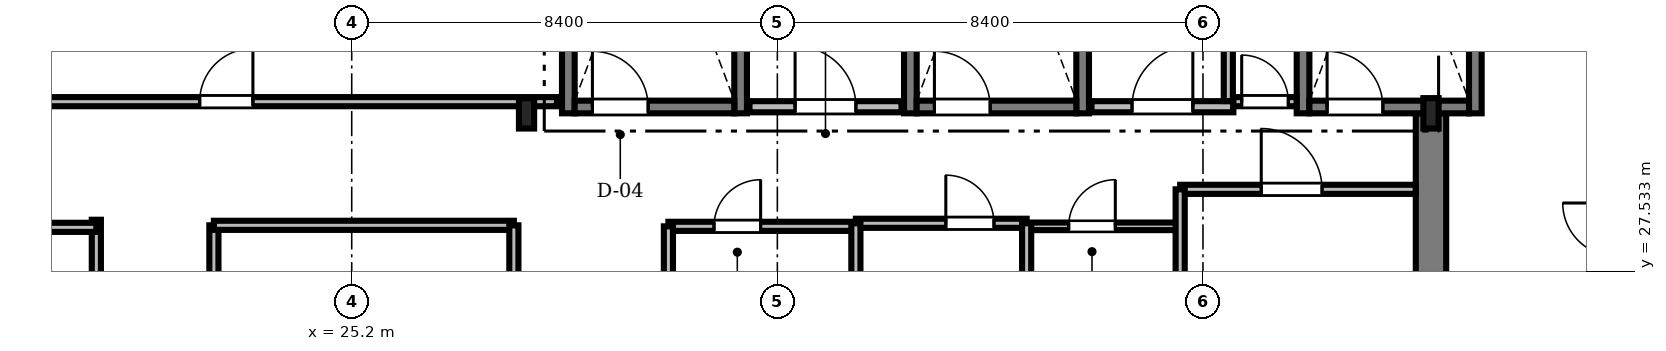
"""IFC4 building model, lengths in metres.
Left out: names, types, materials, properties, quantities, classifications, styles, units other than length and angle.
Written with IfcOpenShell. Run it as: python <this file> out.ifc"""

import sys

from ifc_helpers import new_model, si_unit, direction, frame, frame_2d, origin, origin_2d, place, context, subcontext, project, spatial, rectangle, i_section, extrude, source, transform, mapped, element, fill, save


model = new_model("IFC4")
c1 = context("Model", 3, precision=1e-05, world=origin(), true_north=direction((0.0, 1.0)))
c2 = subcontext(c1, "Body", "Model", "MODEL_VIEW")
j1 = project(units=[si_unit("LENGTHUNIT", "METRE"), si_unit("PLANEANGLEUNIT", "RADIAN")], contexts=[c1])
p1 = place(None, origin())
s1 = spatial("IfcSite", under=j1, at=p1, CompositionType="ELEMENT")
p2 = place(p1, origin())
s2 = spatial("IfcBuilding", under=s1, at=p2, CompositionType="ELEMENT")
p3 = place(p2, frame((0.0, 0.0, 242.7)))
s3 = spatial("IfcBuildingStorey", under=s2, at=p3, CompositionType="ELEMENT", Elevation=242.7)
m1 = source(origin(), c2, "Body", "SweptSolid", [
    extrude(rectangle(XDim=13.15, YDim=0.6, at=frame_2d((6.575, 0.0))), origin(), (0.0, 0.0, 1.0), 3.73),
])
p4 = place(p3, frame((46.5, 17.5, 0.0), z_axis=(0.0, 0.0, 1.0), x_axis=(0.0, 1.0, 0.0)))
e1 = element("IfcWall", 1, at=p4, inside=s3, PredefinedType="SHEAR", context=c2, shape_type="MappedRepresentation", body=[
    mapped(m1, transform((0.0, 0.0, 0.0), scale=1.0)),
])
m2 = source(origin(), c2, "Body", "SweptSolid", [
    extrude(i_section(OverallWidth=0.3, OverallDepth=0.6, WebThickness=0.015, FlangeThickness=0.03, FilletRadius=0.027, at=origin_2d()), origin(), (0.0, 0.0, 1.0), 3.73),
])
for number, where, z_axis, x_axis in (
    (2, (28.65, 30.65, 0.0), (0.0, 0.0, 1.0), (1.0, 0.0, 0.0)),
    (3, (46.5, 30.65, 0.0), (0.0, 0.0, 1.0), (1.0, 0.0, 0.0)),
):
    element("IfcColumn", number, at=place(p3, frame(where, z_axis=z_axis, x_axis=x_axis)), inside=s3, PredefinedType="COLUMN", context=c2, shape_type="MappedRepresentation", body=[
        mapped(m2, transform((0.0, 0.0, 0.0), scale=1.0)),
    ])
m3 = source(origin(), c2, "Body", "SweptSolid", [
    extrude(rectangle(XDim=9.35, YDim=0.25, at=frame_2d((4.675, 0.0))), origin(), (0.0, 0.0, 1.0), 3.75),
])
for number, where, z_axis, x_axis in (
    (4, (29.475, 30.65, 0.0), (0.0, 0.0, 1.0), (0.0, 1.0, 0.0)),
    (5, (32.875, 30.65, 0.0), (0.0, 0.0, 1.0), (0.0, 1.0, 0.0)),
):
    element("IfcWall", number, at=place(p3, frame(where, z_axis=z_axis, x_axis=x_axis)), inside=s3, PredefinedType="SOLIDWALL", context=c2, shape_type="MappedRepresentation", body=[
        mapped(m3, transform((0.0, 0.0, 0.0), scale=1.0)),
    ])
m4 = source(origin(), c2, "Body", "SweptSolid", [
    extrude(rectangle(XDim=3.15, YDim=0.25, at=frame_2d((1.575, 0.0))), origin(), (0.0, 0.0, 1.0), 3.75),
])
p5 = place(p3, frame((29.6, 30.775, 0.0), z_axis=(0.0, 0.0, 1.0), x_axis=(1.0, 0.0, 0.0)))
e6 = element("IfcWall", 6, at=p5, inside=s3, PredefinedType="SOLIDWALL", context=c2, shape_type="MappedRepresentation", body=[
    mapped(m4, transform((0.0, 0.0, 0.0), scale=1.0)),
])
m5 = source(origin(), c2, "Body", "SweptSolid", [
    extrude(rectangle(XDim=1.1, YDim=2.2, at=frame_2d((0.55, 1.1))), frame((0.0, 0.135, 0.0), z_axis=(0.0, -1.0, 0.0), x_axis=(1.0, 0.0, 0.0)), (0.0, 0.0, 1.0), 0.27),
])
p6 = place(p5, frame((0.35, 0.0, 0.0)))
e7 = element("IfcOpeningElement", 7, at=p6, cuts=e6, PredefinedType="OPENING", context=c2, shape_type="MappedRepresentation", body=[
    mapped(m5, transform((0.0, 0.0, 0.0), scale=1.0)),
])
for number, where, z_axis, x_axis in (
    (8, (36.225, 30.65, 0.0), (0.0, 0.0, 1.0), (0.0, 1.0, 0.0)),
    (9, (39.625, 30.65, 0.0), (0.0, 0.0, 1.0), (0.0, 1.0, 0.0)),
):
    element("IfcWall", number, at=place(p3, frame(where, z_axis=z_axis, x_axis=x_axis)), inside=s3, PredefinedType="SOLIDWALL", context=c2, shape_type="MappedRepresentation", body=[
        mapped(m3, transform((0.0, 0.0, 0.0), scale=1.0)),
    ])
p7 = place(p3, frame((36.35, 30.775, 0.0), z_axis=(0.0, 0.0, 1.0), x_axis=(1.0, 0.0, 0.0)))
e10 = element("IfcWall", 10, at=p7, inside=s3, PredefinedType="SOLIDWALL", context=c2, shape_type="MappedRepresentation", body=[
    mapped(m4, transform((0.0, 0.0, 0.0), scale=1.0)),
])
p8 = place(p7, frame((0.35, 0.0, 0.0)))
e11 = element("IfcOpeningElement", 11, at=p8, cuts=e10, PredefinedType="OPENING", context=c2, shape_type="MappedRepresentation", body=[
    mapped(m5, transform((0.0, 0.0, 0.0), scale=1.0)),
])
for number, where, z_axis, x_axis in (
    (12, (43.975, 30.65, 0.0), (0.0, 0.0, 1.0), (0.0, 1.0, 0.0)),
    (13, (47.375, 30.65, 0.0), (0.0, 0.0, 1.0), (0.0, 1.0, 0.0)),
):
    element("IfcWall", number, at=place(p3, frame(where, z_axis=z_axis, x_axis=x_axis)), inside=s3, PredefinedType="SOLIDWALL", context=c2, shape_type="MappedRepresentation", body=[
        mapped(m3, transform((0.0, 0.0, 0.0), scale=1.0)),
    ])
p9 = place(p3, frame((44.1, 30.775, 0.0), z_axis=(0.0, 0.0, 1.0), x_axis=(1.0, 0.0, 0.0)))
e14 = element("IfcWall", 14, at=p9, inside=s3, PredefinedType="SOLIDWALL", context=c2, shape_type="MappedRepresentation", body=[
    mapped(m4, transform((0.0, 0.0, 0.0), scale=1.0)),
])
p10 = place(p9, frame((0.35, 0.0, 0.0)))
e15 = element("IfcOpeningElement", 15, at=p10, cuts=e14, PredefinedType="OPENING", context=c2, shape_type="MappedRepresentation", body=[
    mapped(m5, transform((0.0, 0.0, 0.0), scale=1.0)),
])
m6 = source(origin(), c2, "Body", "SweptSolid", [
    extrude(rectangle(XDim=3.0, YDim=0.22, at=frame_2d((1.5, 0.0))), origin(), (0.0, 0.0, 1.0), 3.73),
])
p11 = place(p3, frame((33.05, 30.78, 0.0), z_axis=(0.0, 0.0, 1.0), x_axis=(1.0, 0.0, 0.0)))
e16 = element("IfcWall", 16, at=p11, inside=s3, PredefinedType="SOLIDWALL", context=c2, shape_type="MappedRepresentation", body=[
    mapped(m6, transform((0.0, 0.0, 0.0), scale=1.0)),
])
m7 = source(origin(), c2, "Body", "SweptSolid", [
    extrude(rectangle(XDim=1.2, YDim=2.2, at=frame_2d((0.6, 1.1))), frame((0.0, 0.12, 0.0), z_axis=(0.0, -1.0, 0.0), x_axis=(1.0, 0.0, 0.0)), (0.0, 0.0, 1.0), 0.24),
])
p12 = place(p11, frame((0.9, 0.0, 0.0)))
e17 = element("IfcOpeningElement", 17, at=p12, cuts=e16, PredefinedType="OPENING", context=c2, shape_type="MappedRepresentation", body=[
    mapped(m7, transform((0.0, 0.0, 0.0), scale=1.0)),
])
m8 = source(origin(), c2, "Body", "SweptSolid", [
    extrude(rectangle(XDim=2.8, YDim=0.22, at=frame_2d((1.4, 0.0))), origin(), (0.0, 0.0, 1.0), 3.73),
])
p13 = place(p3, frame((39.8, 30.78, 0.0), z_axis=(0.0, 0.0, 1.0), x_axis=(1.0, 0.0, 0.0)))
e18 = element("IfcWall", 18, at=p13, inside=s3, PredefinedType="SOLIDWALL", context=c2, shape_type="MappedRepresentation", body=[
    mapped(m8, transform((0.0, 0.0, 0.0), scale=1.0)),
])
p14 = place(p13, frame((0.8, 0.0, 0.0)))
e19 = element("IfcOpeningElement", 19, at=p14, cuts=e18, PredefinedType="OPENING", context=c2, shape_type="MappedRepresentation", body=[
    mapped(m7, transform((0.0, 0.0, 0.0), scale=1.0)),
])
m9 = source(origin(), c2, "Body", "SweptSolid", [
    extrude(rectangle(XDim=15.1, YDim=0.18, at=frame_2d((7.55, 0.0))), origin(), (0.0, 0.0, 1.0), 3.172),
])
p15 = place(p3, frame((20.16, 13.45, 0.0), z_axis=(0.0, 0.0, 1.0), x_axis=(0.0, 1.0, 0.0)))
e20 = element("IfcWall", 20, at=p15, inside=s3, PredefinedType="PARTITIONING", context=c2, shape_type="MappedRepresentation", body=[
    mapped(m9, transform((0.0, 0.0, 0.0), scale=1.0)),
])
m10 = source(origin(), c2, "Body", "SweptSolid", [
    extrude(rectangle(XDim=1.05, YDim=2.2, at=frame_2d((0.525, 1.1))), frame((0.0, 0.1, 0.0), z_axis=(0.0, -1.0, 0.0), x_axis=(1.0, 0.0, 0.0)), (0.0, 0.0, 1.0), 0.2),
])
p16 = place(p15, frame((3.218, 0.0, 0.0)))
e21 = element("IfcOpeningElement", 21, at=p16, cuts=e20, PredefinedType="OPENING", context=c2, shape_type="MappedRepresentation", body=[
    mapped(m10, transform((0.0, 0.0, 0.0), scale=1.0)),
])
m11 = source(origin(), c2, "Body", "SweptSolid", [
    extrude(rectangle(XDim=0.95, YDim=2.15, at=frame_2d((0.475, 1.075))), frame((0.0, 0.1, 0.0), z_axis=(0.0, -1.0, 0.0), x_axis=(1.0, 0.0, 0.0)), (0.0, 0.0, 1.0), 0.2),
])
p17 = place(p15, frame((11.917, 0.0, 0.0)))
e22 = element("IfcOpeningElement", 22, at=p17, cuts=e20, PredefinedType="OPENING", context=c2, shape_type="MappedRepresentation", body=[
    mapped(m11, transform((0.0, 0.0, 0.0), scale=1.0)),
])
m12 = source(origin(), c2, "Body", "SweptSolid", [
    extrude(rectangle(XDim=13.328, YDim=0.18, at=frame_2d((6.664, 0.0))), origin(), (0.0, 0.0, 1.0), 2.972),
])
p18 = place(p3, frame((15.922, 30.88, 0.0), z_axis=(0.0, 0.0, 1.0), x_axis=(1.0, 0.0, 0.0)))
e23 = element("IfcWall", 23, at=p18, inside=s3, PredefinedType="PARTITIONING", context=c2, shape_type="MappedRepresentation", body=[
    mapped(m12, transform((0.0, 0.0, 0.0), scale=1.0)),
])
p19 = place(p18, frame((6.278, 0.0, 0.0)))
e24 = element("IfcOpeningElement", 24, at=p19, cuts=e23, PredefinedType="OPENING", context=c2, shape_type="MappedRepresentation", body=[
    mapped(m10, transform((0.0, 0.0, 0.0), scale=1.0)),
])
m13 = source(origin(), c2, "Body", "SweptSolid", [
    extrude(rectangle(XDim=4.648, YDim=0.18, at=frame_2d((2.324, 0.0))), origin(), (0.0, 0.0, 1.0), 3.362),
])
p20 = place(p3, frame((41.55, 29.15, 0.0), z_axis=(0.0, 0.0, 1.0), x_axis=(1.0, 0.0, 0.0)))
e25 = element("IfcWall", 25, at=p20, inside=s3, PredefinedType="PARTITIONING", context=c2, shape_type="MappedRepresentation", body=[
    mapped(m13, transform((0.0, 0.0, 0.0), scale=1.0)),
])
m14 = source(origin(), c2, "Body", "SweptSolid", [
    extrude(rectangle(XDim=1.2, YDim=2.2, at=frame_2d((0.6, 1.1))), frame((0.0, 0.1, 0.0), z_axis=(0.0, -1.0, 0.0), x_axis=(1.0, 0.0, 0.0)), (0.0, 0.0, 1.0), 0.2),
])
p21 = place(p20, frame((1.6, 0.0, 0.0)))
e26 = element("IfcOpeningElement", 26, at=p21, cuts=e25, PredefinedType="OPENING", context=c2, shape_type="MappedRepresentation", body=[
    mapped(m14, transform((0.0, 0.0, 0.0), scale=1.0)),
])
m15 = source(origin(), c2, "Body", "SweptSolid", [
    extrude(rectangle(XDim=4.24, YDim=0.18, at=frame_2d((2.12, 0.0))), origin(), (0.0, 0.0, 1.0), 3.172),
])
p22 = place(p3, frame((22.48, 24.2, 0.0), z_axis=(0.0, 0.0, 1.0), x_axis=(0.0, 1.0, 0.0)))
e27 = element("IfcWall", 27, at=p22, inside=s3, PredefinedType="PARTITIONING", context=c2, shape_type="MappedRepresentation", body=[
    mapped(m15, transform((0.0, 0.0, 0.0), scale=1.0)),
])
p23 = place(p22, frame((1.4, 0.0, 0.0)))
e28 = element("IfcOpeningElement", 28, at=p23, cuts=e27, PredefinedType="OPENING", context=c2, shape_type="MappedRepresentation", body=[
    mapped(m10, transform((0.0, 0.0, 0.0), scale=1.0)),
])
m16 = source(origin(), c2, "Body", "SweptSolid", [
    extrude(rectangle(XDim=3.7, YDim=0.18, at=frame_2d((1.85, 0.0))), origin(), (0.0, 0.0, 1.0), 3.362),
])
p24 = place(p3, frame((31.45, 28.42, 0.0), z_axis=(0.0, 0.0, 1.0), x_axis=(1.0, 0.0, 0.0)))
e29 = element("IfcWall", 29, at=p24, inside=s3, PredefinedType="PARTITIONING", context=c2, shape_type="MappedRepresentation", body=[
    mapped(m16, transform((0.0, 0.0, 0.0), scale=1.0)),
])
m17 = source(origin(), c2, "Body", "SweptSolid", [
    extrude(rectangle(XDim=0.92, YDim=2.1, at=frame_2d((0.46, 1.05))), frame((0.0, 0.1, 0.0), z_axis=(0.0, -1.0, 0.0), x_axis=(1.0, 0.0, 0.0)), (0.0, 0.0, 1.0), 0.2),
])
p25 = place(p24, frame((0.9, 0.0, 0.0)))
e30 = element("IfcOpeningElement", 30, at=p25, cuts=e29, PredefinedType="OPENING", context=c2, shape_type="MappedRepresentation", body=[
    mapped(m17, transform((0.0, 0.0, 0.0), scale=1.0)),
])
m18 = source(origin(), c2, "Body", "SweptSolid", [
    extrude(rectangle(XDim=3.37, YDim=0.18, at=frame_2d((1.685, 0.0))), origin(), (0.0, 0.0, 1.0), 3.73),
])
p26 = place(p3, frame((35.15, 28.48, 0.0), z_axis=(0.0, 0.0, 1.0), x_axis=(1.0, 0.0, 0.0)))
e31 = element("IfcWall", 31, at=p26, inside=s3, PredefinedType="PARTITIONING", context=c2, shape_type="MappedRepresentation", body=[
    mapped(m18, transform((0.0, 0.0, 0.0), scale=1.0)),
])
p27 = place(p26, frame((1.775, 0.0, 0.0)))
e32 = element("IfcOpeningElement", 32, at=p27, cuts=e31, PredefinedType="OPENING", context=c2, shape_type="MappedRepresentation", body=[
    mapped(m11, transform((0.0, 0.0, 0.0), scale=1.0)),
])
m19 = source(origin(), c2, "Body", "SweptSolid", [
    extrude(rectangle(XDim=3.0, YDim=0.15, at=frame_2d((1.5, 0.0))), origin(), (0.0, 0.0, 1.0), 3.73),
])
p28 = place(p3, frame((38.52, 28.42, 0.0), z_axis=(0.0, 0.0, 1.0), x_axis=(1.0, 0.0, 0.0)))
e33 = element("IfcWall", 33, at=p28, inside=s3, PredefinedType="PARTITIONING", context=c2, shape_type="MappedRepresentation", body=[
    mapped(m19, transform((0.0, 0.0, 0.0), scale=1.0)),
])
m20 = source(origin(), c2, "Body", "SweptSolid", [
    extrude(rectangle(XDim=0.92, YDim=2.1, at=frame_2d((0.46, 1.05))), frame((0.0, 0.085, 0.0), z_axis=(0.0, -1.0, 0.0), x_axis=(1.0, 0.0, 0.0)), (0.0, 0.0, 1.0), 0.17),
])
p29 = place(p28, frame((0.83, 0.0, 0.0)))
e34 = element("IfcOpeningElement", 34, at=p29, cuts=e33, PredefinedType="OPENING", context=c2, shape_type="MappedRepresentation", body=[
    mapped(m20, transform((0.0, 0.0, 0.0), scale=1.0)),
])
m21 = source(origin(), c2, "Body", "SweptSolid", [
    extrude(rectangle(XDim=1.248, YDim=0.18, at=frame_2d((0.624, 0.0))), origin(), (0.0, 0.0, 1.0), 3.73),
])
p30 = place(p3, frame((42.6, 30.88, 0.0), z_axis=(0.0, 0.0, 1.0), x_axis=(1.0, 0.0, 0.0)))
e35 = element("IfcWall", 35, at=p30, inside=s3, PredefinedType="PARTITIONING", context=c2, shape_type="MappedRepresentation", body=[
    mapped(m21, transform((0.0, 0.0, 0.0), scale=1.0)),
])
p31 = place(p30, frame((0.164, 0.0, 0.0)))
e36 = element("IfcOpeningElement", 36, at=p31, cuts=e35, PredefinedType="OPENING", context=c2, shape_type="MappedRepresentation", body=[
    mapped(m17, transform((0.0, 0.0, 0.0), scale=1.0)),
])
m22 = source(origin(), c2, "Body", "SweptSolid", [
    extrude(rectangle(XDim=5.92, YDim=0.18, at=frame_2d((2.96, 0.0))), origin(), (0.0, 0.0, 1.0), 3.73),
])
p32 = place(p3, frame((22.48, 28.44, 0.0), z_axis=(0.0, 0.0, 1.0), x_axis=(1.0, 0.0, 0.0)))
e37 = element("IfcWall", 37, at=p32, inside=s3, PredefinedType="PARTITIONING", context=c2, shape_type="MappedRepresentation", body=[
    mapped(m22, transform((0.0, 0.0, 0.0), scale=1.0)),
])
m23 = source(origin(), c2, "Body", "SweptSolid", [
    extrude(rectangle(XDim=4.43, YDim=0.18, at=frame_2d((2.215, 0.0))), origin(), (0.0, 0.0, 1.0), 2.972),
])
p33 = place(p3, frame((15.73, 28.4, 0.0), z_axis=(0.0, 0.0, 1.0), x_axis=(1.0, 0.0, 0.0)))
e38 = element("IfcWall", 38, at=p33, inside=s3, PredefinedType="PARTITIONING", context=c2, shape_type="MappedRepresentation", body=[
    mapped(m23, transform((0.0, 0.0, 0.0), scale=1.0)),
])
p34 = place(p3, frame((28.4, 24.2, 0.0), z_axis=(0.0, 0.0, 1.0), x_axis=(0.0, 1.0, 0.0)))
e39 = element("IfcWall", 39, at=p34, inside=s3, PredefinedType="PARTITIONING", context=c2, shape_type="MappedRepresentation", body=[
    mapped(m15, transform((0.0, 0.0, 0.0), scale=1.0)),
])
m24 = source(origin(), c2, "Body", "SweptSolid", [
    extrude(rectangle(XDim=2.35, YDim=0.18, at=frame_2d((1.175, 0.0))), origin(), (0.0, 0.0, 1.0), 3.362),
])
p35 = place(p3, frame((41.55, 26.8, 0.0), z_axis=(0.0, 0.0, 1.0), x_axis=(0.0, 1.0, 0.0)))
e40 = element("IfcWall", 40, at=p35, inside=s3, PredefinedType="PARTITIONING", context=c2, shape_type="MappedRepresentation", body=[
    mapped(m24, transform((0.0, 0.0, 0.0), scale=1.0)),
])
m25 = source(origin(), c2, "Body", "SweptSolid", [
    extrude(rectangle(XDim=1.858, YDim=0.18, at=frame_2d((0.929, 0.0))), origin(), (0.0, 0.0, 1.0), 3.73),
])
p36 = place(p3, frame((42.5, 30.892, 0.0), z_axis=(0.0, 0.0, 1.0), x_axis=(0.0, 1.0, 0.0)))
e41 = element("IfcWall", 41, at=p36, inside=s3, PredefinedType="PARTITIONING", context=c2, shape_type="MappedRepresentation", body=[
    mapped(m25, transform((0.0, 0.0, 0.0), scale=1.0)),
])
m26 = source(origin(), c2, "Body", "SweptSolid", [
    extrude(rectangle(XDim=1.66, YDim=0.18, at=frame_2d((0.83, 0.0))), origin(), (0.0, 0.0, 1.0), 3.272),
])
for number, where, z_axis, x_axis in (
    (42, (35.15, 26.82, 0.0), (0.0, 0.0, 1.0), (0.0, 1.0, 0.0)),
    (43, (38.52, 26.82, 0.0), (0.0, 0.0, 1.0), (0.0, 1.0, 0.0)),
):
    element("IfcWall", number, at=place(p3, frame(where, z_axis=z_axis, x_axis=x_axis)), inside=s3, PredefinedType="PARTITIONING", context=c2, shape_type="MappedRepresentation", body=[
        mapped(m26, transform((0.0, 0.0, 0.0), scale=1.0)),
    ])
m27 = source(origin(), c2, "Body", "SweptSolid", [
    extrude(rectangle(XDim=1.6, YDim=0.18, at=frame_2d((0.8, 0.0))), origin(), (0.0, 0.0, 1.0), 3.272),
])
p37 = place(p3, frame((31.45, 26.82, 0.0), z_axis=(0.0, 0.0, 1.0), x_axis=(0.0, 1.0, 0.0)))
e44 = element("IfcWall", 44, at=p37, inside=s3, PredefinedType="PARTITIONING", context=c2, shape_type="MappedRepresentation", body=[
    mapped(m27, transform((0.0, 0.0, 0.0), scale=1.0)),
])
m28 = source(origin(), c2, "Body", "SweptSolid", [
    extrude(rectangle(XDim=1.1, YDim=2.2, at=frame_2d((0.55, 1.1))), frame((0.0, 0.025, 0.0), z_axis=(0.0, -1.0, 0.0), x_axis=(1.0, 0.0, 0.0)), (0.0, 0.0, 1.0), 0.05),
])
p38 = place(p6, origin())
e45 = element("IfcDoor", 45, at=p38, inside=s3, OperationType="SINGLE_SWING_LEFT", PredefinedType="DOOR", context=c2, shape_type="MappedRepresentation", body=[
    mapped(m28, transform((0.0, 0.0, 0.0), scale=1.0)),
])
fill(e7, e45)
p39 = place(p8, origin())
e46 = element("IfcDoor", 46, at=p39, inside=s3, OperationType="SINGLE_SWING_LEFT", PredefinedType="DOOR", context=c2, shape_type="MappedRepresentation", body=[
    mapped(m28, transform((0.0, 0.0, 0.0), scale=1.0)),
])
fill(e11, e46)
p40 = place(p10, origin())
e47 = element("IfcDoor", 47, at=p40, inside=s3, OperationType="SINGLE_SWING_LEFT", PredefinedType="DOOR", context=c2, shape_type="MappedRepresentation", body=[
    mapped(m28, transform((0.0, 0.0, 0.0), scale=1.0)),
])
fill(e15, e47)
m29 = source(origin(), c2, "Body", "SweptSolid", [
    extrude(rectangle(XDim=1.2, YDim=2.2, at=frame_2d((0.6, 1.1))), frame((0.0, 0.025, 0.0), z_axis=(0.0, -1.0, 0.0), x_axis=(1.0, 0.0, 0.0)), (0.0, 0.0, 1.0), 0.05),
])
p41 = place(p12, origin())
e48 = element("IfcDoor", 48, at=p41, inside=s3, OperationType="SINGLE_SWING_LEFT", PredefinedType="DOOR", context=c2, shape_type="MappedRepresentation", body=[
    mapped(m29, transform((0.0, 0.0, 0.0), scale=1.0)),
])
fill(e17, e48)
p42 = place(p14, origin())
e49 = element("IfcDoor", 49, at=p42, inside=s3, OperationType="SINGLE_SWING_RIGHT", PredefinedType="DOOR", context=c2, shape_type="MappedRepresentation", body=[
    mapped(m29, transform((0.0, 0.0, 0.0), scale=1.0)),
])
fill(e19, e49)
m30 = source(origin(), c2, "Body", "SweptSolid", [
    extrude(rectangle(XDim=1.05, YDim=2.2, at=frame_2d((0.525, 1.1))), frame((0.0, 0.025, 0.0), z_axis=(0.0, -1.0, 0.0), x_axis=(1.0, 0.0, 0.0)), (0.0, 0.0, 1.0), 0.05),
])
p43 = place(p19, origin())
e50 = element("IfcDoor", 50, at=p43, inside=s3, OperationType="SINGLE_SWING_RIGHT", PredefinedType="DOOR", context=c2, shape_type="MappedRepresentation", body=[
    mapped(m30, transform((0.0, 0.0, 0.0), scale=1.0)),
])
fill(e24, e50)
p44 = place(p21, origin())
e51 = element("IfcDoor", 51, at=p44, inside=s3, OperationType="SINGLE_SWING_LEFT", PredefinedType="DOOR", context=c2, shape_type="MappedRepresentation", body=[
    mapped(m29, transform((0.0, 0.0, 0.0), scale=1.0)),
])
fill(e26, e51)
m31 = source(origin(), c2, "Body", "SweptSolid", [
    extrude(rectangle(XDim=0.92, YDim=2.1, at=frame_2d((0.46, 1.05))), frame((0.0, 0.025, 0.0), z_axis=(0.0, -1.0, 0.0), x_axis=(1.0, 0.0, 0.0)), (0.0, 0.0, 1.0), 0.05),
])
p45 = place(p25, origin())
e52 = element("IfcDoor", 52, at=p45, inside=s3, OperationType="SINGLE_SWING_RIGHT", PredefinedType="DOOR", context=c2, shape_type="MappedRepresentation", body=[
    mapped(m31, transform((0.0, 0.0, 0.0), scale=1.0)),
])
fill(e30, e52)
m32 = source(origin(), c2, "Body", "SweptSolid", [
    extrude(rectangle(XDim=0.95, YDim=2.15, at=frame_2d((0.475, 1.075))), frame((0.0, 0.025, 0.0), z_axis=(0.0, -1.0, 0.0), x_axis=(1.0, 0.0, 0.0)), (0.0, 0.0, 1.0), 0.05),
])
p46 = place(p27, origin())
e53 = element("IfcDoor", 53, at=p46, inside=s3, OperationType="SINGLE_SWING_LEFT", PredefinedType="DOOR", context=c2, shape_type="MappedRepresentation", body=[
    mapped(m32, transform((0.0, 0.0, 0.0), scale=1.0)),
])
fill(e32, e53)
p47 = place(p29, origin())
e54 = element("IfcDoor", 54, at=p47, inside=s3, OperationType="SINGLE_SWING_RIGHT", PredefinedType="DOOR", context=c2, shape_type="MappedRepresentation", body=[
    mapped(m31, transform((0.0, 0.0, 0.0), scale=1.0)),
])
fill(e34, e54)
p48 = place(p31, origin())
e55 = element("IfcDoor", 55, at=p48, inside=s3, OperationType="SINGLE_SWING_LEFT", PredefinedType="DOOR", context=c2, shape_type="MappedRepresentation", body=[
    mapped(m31, transform((0.0, 0.0, 0.0), scale=1.0)),
])
fill(e36, e55)
save(model, sys.argv[1])
